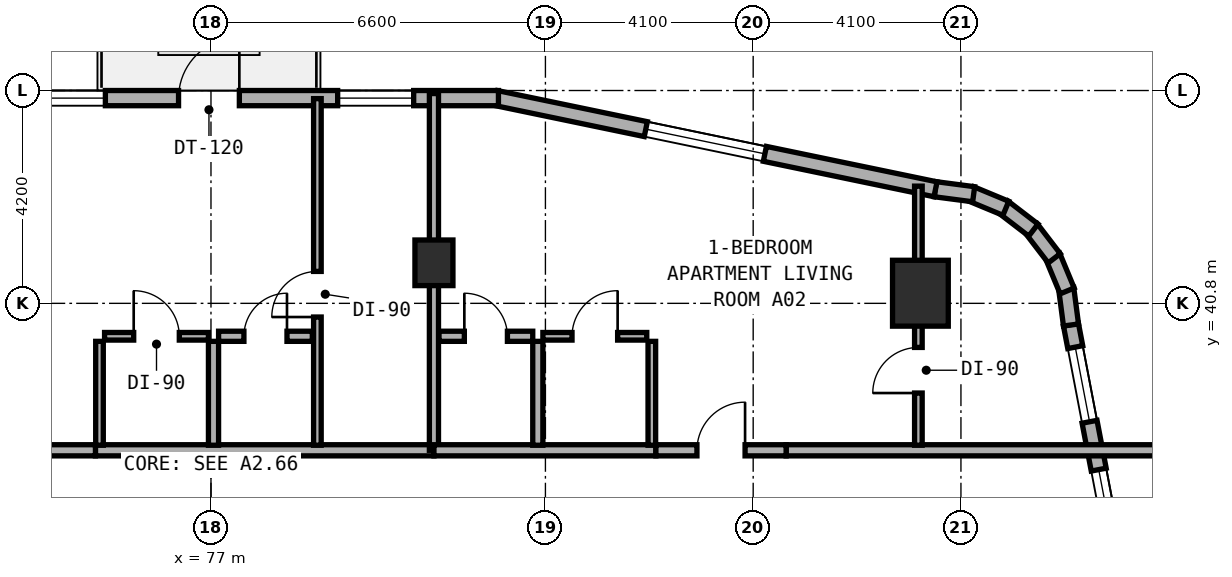
"""IFC4 building model, lengths in metres.
Left out: names, types, materials, properties, quantities, classifications, styles, units other than length and angle.
Written with IfcOpenShell. Run it as: python <this file> out.ifc"""

import sys

from ifc_helpers import new_model, si_unit, direction, frame, frame_2d, origin, origin_2d, place, context, subcontext, project, spatial, rectangle, extrude, element, fill, save


model = new_model("IFC4")
c1 = context("Model", 3, precision=1e-05, world=origin(), true_north=direction((0.0, 1.0)))
c2 = subcontext(c1, "Body", "Model", "MODEL_VIEW")
j1 = project(units=[si_unit("LENGTHUNIT", "METRE"), si_unit("PLANEANGLEUNIT", "RADIAN")], contexts=[c1])
p1 = place(None, origin())
s1 = spatial("IfcSite", under=j1, at=p1, CompositionType="ELEMENT")
p2 = place(p1, origin())
s2 = spatial("IfcBuilding", under=s1, at=p2, CompositionType="ELEMENT")
p3 = place(p2, frame((0.0, 0.0, 27.5)))
s3 = spatial("IfcBuildingStorey", under=s2, at=p3, CompositionType="ELEMENT", Elevation=27.5)
p4 = place(p3, frame((81.4, 41.6, 0.0), z_axis=(0.0, 0.0, 1.0), x_axis=(1.0, 0.0, 0.0)))
e1 = element("IfcColumn", 1, at=p4, inside=s3, PredefinedType="COLUMN", context=c2, shape_type="SweptSolid", body=[
    extrude(rectangle(XDim=0.75, YDim=0.9, at=origin_2d()), origin(), (0.0, 0.0, 1.0), 3.5),
])
p5 = place(p3, frame((91.0, 41.0, 0.0), z_axis=(0.0, 0.0, 1.0), x_axis=(1.0, 0.0, 0.0)))
e2 = element("IfcColumn", 2, at=p5, inside=s3, PredefinedType="COLUMN", context=c2, shape_type="SweptSolid", body=[
    extrude(rectangle(XDim=1.1, YDim=1.3, at=origin_2d()), origin(), (0.0, 0.0, 1.0), 3.5),
])
p6 = place(p3, frame((95.783, 30.918, 0.0), z_axis=(0.0, 0.0, 1.0), x_axis=(-0.188087874316, 0.982152203854, 0.0)))
e3 = element("IfcWall", 3, at=p6, inside=s3, PredefinedType="STANDARD", context=c2, shape_type="SweptSolid", body=[
    extrude(rectangle(XDim=9.634, YDim=0.3, at=frame_2d((4.817, 0.0))), origin(), (0.0, 0.0, 1.0), 3.25),
])
p7 = place(p6, frame((1.999, 0.0, 0.8)))
e4 = element("IfcOpeningElement", 4, at=p7, cuts=e3, PredefinedType="OPENING", context=c2, shape_type="SweptSolid", body=[
    extrude(rectangle(XDim=2.4, YDim=1.6, at=frame_2d((1.2, 0.8))), frame((0.0, 0.16, 0.0), z_axis=(0.0, -1.0, 0.0), x_axis=(1.0, 0.0, 0.0)), (0.0, 0.0, 1.0), 0.32),
])
p8 = place(p6, frame((5.521, 0.0, 0.85)))
e5 = element("IfcOpeningElement", 5, at=p8, cuts=e3, PredefinedType="OPENING", context=c2, shape_type="SweptSolid", body=[
    extrude(rectangle(XDim=1.2, YDim=1.5, at=frame_2d((0.6, 0.75))), frame((0.0, 0.16, 0.0), z_axis=(0.0, -1.0, 0.0), x_axis=(1.0, 0.0, 0.0)), (0.0, 0.0, 1.0), 0.32),
])
p9 = place(p6, frame((7.682, 0.0, 0.85)))
e6 = element("IfcOpeningElement", 6, at=p9, cuts=e3, PredefinedType="OPENING", context=c2, shape_type="SweptSolid", body=[
    extrude(rectangle(XDim=1.5, YDim=1.5, at=frame_2d((0.75, 0.75))), frame((0.0, 0.16, 0.0), z_axis=(0.0, -1.0, 0.0), x_axis=(1.0, 0.0, 0.0)), (0.0, 0.0, 1.0), 0.32),
])
p10 = place(p3, frame((93.972, 40.373, 0.0), z_axis=(0.0, 0.0, 1.0), x_axis=(-0.130255288807, 0.991480488834, 0.0)))
e7 = element("IfcWall", 7, at=p10, inside=s3, PredefinedType="STANDARD", context=c2, shape_type="SweptSolid", body=[
    extrude(rectangle(XDim=0.729, YDim=0.3, at=frame_2d((0.365, 0.0))), origin(), (0.0, 0.0, 1.0), 3.25),
])
p11 = place(p3, frame((93.896, 41.045, 0.0), z_axis=(0.0, 0.0, 1.0), x_axis=(-0.383267045233, 0.923637576129, 0.0)))
e8 = element("IfcWall", 8, at=p11, inside=s3, PredefinedType="STANDARD", context=c2, shape_type="SweptSolid", body=[
    extrude(rectangle(XDim=0.746, YDim=0.3, at=frame_2d((0.373, 0.0))), origin(), (0.0, 0.0, 1.0), 3.25),
])
for number, where, z_axis, x_axis in (
    (9, (93.641, 41.689, 0.0), (0.0, 0.0, 1.0), (-0.609, 0.793, 0.0)),
    (10, (93.229, 42.246, 0.0), (0.0, 0.0, 1.0), (-0.794, 0.608, 0.0)),
):
    element("IfcWall", number, at=place(p3, frame(where, z_axis=z_axis, x_axis=x_axis)), inside=s3, PredefinedType="STANDARD", context=c2, shape_type="SweptSolid", body=[
        extrude(rectangle(XDim=0.746, YDim=0.3, at=frame_2d((0.373, 0.0))), origin(), (0.0, 0.0, 1.0), 3.25),
    ])
p12 = place(p3, frame((92.686, 42.676, 0.0), z_axis=(0.0, 0.0, 1.0), x_axis=(-0.923637576129, 0.383267045233, 0.0)))
e11 = element("IfcWall", 11, at=p12, inside=s3, PredefinedType="STANDARD", context=c2, shape_type="SweptSolid", body=[
    extrude(rectangle(XDim=0.746, YDim=0.3, at=frame_2d((0.373, 0.0))), origin(), (0.0, 0.0, 1.0), 3.25),
])
p13 = place(p3, frame((92.051, 42.953, 0.0), z_axis=(0.0, 0.0, 1.0), x_axis=(-0.991559404866, 0.129653178221, 0.0)))
e12 = element("IfcWall", 12, at=p13, inside=s3, PredefinedType="STANDARD", context=c2, shape_type="SweptSolid", body=[
    extrude(rectangle(XDim=0.764, YDim=0.3, at=frame_2d((0.382, 0.0))), origin(), (0.0, 0.0, 1.0), 3.25),
])
p14 = place(p3, frame((91.298, 43.051, 0.0), z_axis=(0.0, 0.0, 1.0), x_axis=(-0.979120793441, 0.203279295189, 0.0)))
e13 = element("IfcWall", 13, at=p14, inside=s3, PredefinedType="STANDARD", context=c2, shape_type="SweptSolid", body=[
    extrude(rectangle(XDim=8.855, YDim=0.3, at=frame_2d((4.427, 0.0))), origin(), (0.0, 0.0, 1.0), 3.25),
])
p15 = place(p14, frame((3.439, 0.0, 0.8)))
e14 = element("IfcOpeningElement", 14, at=p15, cuts=e13, PredefinedType="OPENING", context=c2, shape_type="SweptSolid", body=[
    extrude(rectangle(XDim=2.4, YDim=1.6, at=frame_2d((1.2, 0.8))), frame((0.0, 0.16, 0.0), z_axis=(0.0, -1.0, 0.0), x_axis=(1.0, 0.0, 0.0)), (0.0, 0.0, 1.0), 0.32),
])
p16 = place(p3, frame((82.673, 44.85, 0.0), z_axis=(0.0, 0.0, 1.0), x_axis=(-1.0, 0.0, 0.0)))
e15 = element("IfcWall", 15, at=p16, inside=s3, PredefinedType="STANDARD", context=c2, shape_type="SweptSolid", body=[
    extrude(rectangle(XDim=11.391, YDim=0.3, at=frame_2d((5.696, 0.0))), origin(), (0.0, 0.0, 1.0), 3.25),
])
p17 = place(p16, frame((5.113, 0.0, 0.0)))
e16 = element("IfcOpeningElement", 16, at=p17, cuts=e15, PredefinedType="OPENING", context=c2, shape_type="SweptSolid", body=[
    extrude(rectangle(XDim=1.2, YDim=2.15, at=frame_2d((0.6, 1.075))), frame((0.0, 0.16, 0.0), z_axis=(0.0, -1.0, 0.0), x_axis=(1.0, 0.0, 0.0)), (0.0, 0.0, 1.0), 0.32),
])
p18 = place(p16, frame((1.673, 0.0, 0.85)))
e17 = element("IfcOpeningElement", 17, at=p18, cuts=e15, PredefinedType="OPENING", context=c2, shape_type="SweptSolid", body=[
    extrude(rectangle(XDim=1.5, YDim=1.5, at=frame_2d((0.75, 0.75))), frame((0.0, 0.16, 0.0), z_axis=(0.0, -1.0, 0.0), x_axis=(1.0, 0.0, 0.0)), (0.0, 0.0, 1.0), 0.32),
])
p19 = place(p16, frame((7.757, 0.0, 0.8)))
e18 = element("IfcOpeningElement", 18, at=p19, cuts=e15, PredefinedType="OPENING", context=c2, shape_type="SweptSolid", body=[
    extrude(rectangle(XDim=2.4, YDim=1.6, at=frame_2d((1.2, 0.8))), frame((0.0, 0.16, 0.0), z_axis=(0.0, -1.0, 0.0), x_axis=(1.0, 0.0, 0.0)), (0.0, 0.0, 1.0), 0.32),
])
p20 = place(p3, frame((74.72, 37.9, 0.0), z_axis=(0.0, 0.0, 1.0), x_axis=(1.0, 0.0, 0.0)))
e19 = element("IfcWall", 19, at=p20, inside=s3, PredefinedType="SOLIDWALL", context=c2, shape_type="SweptSolid", body=[
    extrude(rectangle(XDim=6.68, YDim=0.22, at=frame_2d((3.34, 0.0))), origin(), (0.0, 0.0, 1.0), 2.725),
])
p21 = place(p3, frame((65.85, 37.9, 0.0), z_axis=(0.0, 0.0, 1.0), x_axis=(1.0, 0.0, 0.0)))
e20 = element("IfcWall", 20, at=p21, inside=s3, PredefinedType="SOLIDWALL", context=c2, shape_type="SweptSolid", body=[
    extrude(rectangle(XDim=8.87, YDim=0.22, at=frame_2d((4.435, 0.0))), origin(), (0.0, 0.0, 1.0), 2.725),
])
p22 = place(p21, frame((3.96, 0.0, 0.0)))
e21 = element("IfcOpeningElement", 21, at=p22, cuts=e20, PredefinedType="OPENING", context=c2, shape_type="SweptSolid", body=[
    extrude(rectangle(XDim=0.95, YDim=2.1, at=frame_2d((0.475, 1.05))), frame((0.0, 0.12, 0.0), z_axis=(0.0, -1.0, 0.0), x_axis=(1.0, 0.0, 0.0)), (0.0, 0.0, 1.0), 0.24),
])
p23 = place(p3, frame((79.1, 38.0, 0.0), z_axis=(0.0, 0.0, 1.0), x_axis=(0.0, 1.0, 0.0)))
e22 = element("IfcWall", 22, at=p23, inside=s3, PredefinedType="PARTITIONING", context=c2, shape_type="SweptSolid", body=[
    extrude(rectangle(XDim=6.84, YDim=0.15, at=frame_2d((3.42, 0.0))), origin(), (0.0, 0.0, 1.0), 2.775),
])
p24 = place(p23, frame((2.53, 0.0, 0.0)))
e23 = element("IfcOpeningElement", 23, at=p24, cuts=e22, PredefinedType="OPENING", context=c2, shape_type="SweptSolid", body=[
    extrude(rectangle(XDim=0.9, YDim=2.1, at=frame_2d((0.45, 1.05))), frame((0.0, 0.085, 0.0), z_axis=(0.0, -1.0, 0.0), x_axis=(1.0, 0.0, 0.0)), (0.0, 0.0, 1.0), 0.17),
])
p25 = place(p3, frame((77.05, 38.0, 0.0), z_axis=(0.0, 0.0, 1.0), x_axis=(0.0, 1.0, 0.0)))
e24 = element("IfcWall", 24, at=p25, inside=s3, PredefinedType="PLUMBINGWALL", context=c2, shape_type="SweptSolid", body=[
    extrude(rectangle(XDim=2.05, YDim=0.2, at=frame_2d((1.025, 0.0))), origin(), (0.0, 0.0, 1.0), 2.775),
])
p26 = place(p3, frame((74.8, 38.0, 0.0), z_axis=(0.0, 0.0, 1.0), x_axis=(0.0, 1.0, 0.0)))
e25 = element("IfcWall", 25, at=p26, inside=s3, PredefinedType="PARTITIONING", context=c2, shape_type="SweptSolid", body=[
    extrude(rectangle(XDim=2.05, YDim=0.15, at=frame_2d((1.025, 0.0))), origin(), (0.0, 0.0, 1.0), 2.775),
])
p27 = place(p3, frame((77.15, 40.15, 0.0), z_axis=(0.0, 0.0, 1.0), x_axis=(1.0, 0.0, 0.0)))
e26 = element("IfcWall", 26, at=p27, inside=s3, PredefinedType="PLUMBINGWALL", context=c2, shape_type="SweptSolid", body=[
    extrude(rectangle(XDim=1.85, YDim=0.2, at=frame_2d((0.925, 0.0))), origin(), (0.0, 0.0, 1.0), 3.22),
])
p28 = place(p27, frame((0.5, 0.0, 0.0)))
e27 = element("IfcOpeningElement", 27, at=p28, cuts=e26, PredefinedType="OPENING", context=c2, shape_type="SweptSolid", body=[
    extrude(rectangle(XDim=0.85, YDim=2.1, at=frame_2d((0.425, 1.05))), frame((0.0, 0.11, 0.0), z_axis=(0.0, -1.0, 0.0), x_axis=(1.0, 0.0, 0.0)), (0.0, 0.0, 1.0), 0.22),
])
p29 = place(p3, frame((74.9, 40.15, 0.0), z_axis=(0.0, 0.0, 1.0), x_axis=(1.0, 0.0, 0.0)))
e28 = element("IfcWall", 28, at=p29, inside=s3, PredefinedType="PARTITIONING", context=c2, shape_type="SweptSolid", body=[
    extrude(rectangle(XDim=2.05, YDim=0.15, at=frame_2d((1.025, 0.0))), origin(), (0.0, 0.0, 1.0), 3.22),
])
p30 = place(p29, frame((0.575, 0.0, 0.0)))
e29 = element("IfcOpeningElement", 29, at=p30, cuts=e28, PredefinedType="OPENING", context=c2, shape_type="SweptSolid", body=[
    extrude(rectangle(XDim=0.9, YDim=2.1, at=frame_2d((0.45, 1.05))), frame((0.0, 0.085, 0.0), z_axis=(0.0, -1.0, 0.0), x_axis=(1.0, 0.0, 0.0)), (0.0, 0.0, 1.0), 0.17),
])
p31 = place(p3, frame((81.4, 37.9, 0.0), z_axis=(0.0, 0.0, 1.0), x_axis=(0.0, 1.0, 0.0)))
e30 = element("IfcWall", 30, at=p31, inside=s3, PredefinedType="SOLIDWALL", context=c2, shape_type="SweptSolid", body=[
    extrude(rectangle(XDim=7.04, YDim=0.18, at=frame_2d((3.52, 0.0))), origin(), (0.0, 0.0, 1.0), 2.725),
])
p32 = place(p3, frame((81.4, 37.9, 0.0), z_axis=(0.0, 0.0, 1.0), x_axis=(1.0, 0.0, 0.0)))
e31 = element("IfcWall", 31, at=p32, inside=s3, PredefinedType="SOLIDWALL", context=c2, shape_type="SweptSolid", body=[
    extrude(rectangle(XDim=4.38, YDim=0.22, at=frame_2d((2.19, 0.0))), origin(), (0.0, 0.0, 1.0), 2.725),
])
p33 = place(p3, frame((88.35, 37.9, 0.0), z_axis=(0.0, 0.0, 1.0), x_axis=(1.0, 0.0, 0.0)))
e32 = element("IfcWall", 32, at=p33, inside=s3, PredefinedType="SOLIDWALL", context=c2, shape_type="SweptSolid", body=[
    extrude(rectangle(XDim=7.41, YDim=0.22, at=frame_2d((3.705, 0.0))), origin(), (0.0, 0.0, 1.0), 2.865),
])
p34 = place(p3, frame((85.78, 37.9, 0.0), z_axis=(0.0, 0.0, 1.0), x_axis=(1.0, 0.0, 0.0)))
e33 = element("IfcWall", 33, at=p34, inside=s3, PredefinedType="SOLIDWALL", context=c2, shape_type="SweptSolid", body=[
    extrude(rectangle(XDim=2.57, YDim=0.22, at=frame_2d((1.285, 0.0))), origin(), (0.0, 0.0, 1.0), 3.22),
])
p35 = place(p34, frame((0.81, 0.0, 0.0)))
e34 = element("IfcOpeningElement", 34, at=p35, cuts=e33, PredefinedType="OPENING", context=c2, shape_type="SweptSolid", body=[
    extrude(rectangle(XDim=0.95, YDim=2.1, at=frame_2d((0.475, 1.05))), frame((0.0, 0.12, 0.0), z_axis=(0.0, -1.0, 0.0), x_axis=(1.0, 0.0, 0.0)), (0.0, 0.0, 1.0), 0.24),
])
p36 = place(p3, frame((90.96, 38.0, 0.0), z_axis=(0.0, 0.0, 1.0), x_axis=(0.0, 1.0, 0.0)))
e35 = element("IfcWall", 35, at=p36, inside=s3, PredefinedType="PARTITIONING", context=c2, shape_type="SweptSolid", body=[
    extrude(rectangle(XDim=5.113, YDim=0.15, at=frame_2d((2.557, 0.0))), origin(), (0.0, 0.0, 1.0), 2.865),
])
p37 = place(p36, frame((1.03, 0.0, 0.0)))
e36 = element("IfcOpeningElement", 36, at=p37, cuts=e35, PredefinedType="OPENING", context=c2, shape_type="SweptSolid", body=[
    extrude(rectangle(XDim=0.9, YDim=2.1, at=frame_2d((0.45, 1.05))), frame((0.0, 0.085, 0.0), z_axis=(0.0, -1.0, 0.0), x_axis=(1.0, 0.0, 0.0)), (0.0, 0.0, 1.0), 0.17),
])
p38 = place(p3, frame((83.45, 38.0, 0.0), z_axis=(0.0, 0.0, 1.0), x_axis=(0.0, 1.0, 0.0)))
e37 = element("IfcWall", 37, at=p38, inside=s3, PredefinedType="PLUMBINGWALL", context=c2, shape_type="SweptSolid", body=[
    extrude(rectangle(XDim=2.05, YDim=0.2, at=frame_2d((1.025, 0.0))), origin(), (0.0, 0.0, 1.0), 3.22),
])
p39 = place(p3, frame((85.7, 38.0, 0.0), z_axis=(0.0, 0.0, 1.0), x_axis=(0.0, 1.0, 0.0)))
e38 = element("IfcWall", 38, at=p39, inside=s3, PredefinedType="PARTITIONING", context=c2, shape_type="SweptSolid", body=[
    extrude(rectangle(XDim=2.05, YDim=0.15, at=frame_2d((1.025, 0.0))), origin(), (0.0, 0.0, 1.0), 3.22),
])
p40 = place(p3, frame((81.5, 40.15, 0.0), z_axis=(0.0, 0.0, 1.0), x_axis=(1.0, 0.0, 0.0)))
e39 = element("IfcWall", 39, at=p40, inside=s3, PredefinedType="PLUMBINGWALL", context=c2, shape_type="SweptSolid", body=[
    extrude(rectangle(XDim=1.85, YDim=0.2, at=frame_2d((0.925, 0.0))), origin(), (0.0, 0.0, 1.0), 2.725),
])
p41 = place(p40, frame((0.5, 0.0, 0.0)))
e40 = element("IfcOpeningElement", 40, at=p41, cuts=e39, PredefinedType="OPENING", context=c2, shape_type="SweptSolid", body=[
    extrude(rectangle(XDim=0.85, YDim=2.1, at=frame_2d((0.425, 1.05))), frame((0.0, 0.11, 0.0), z_axis=(0.0, -1.0, 0.0), x_axis=(1.0, 0.0, 0.0)), (0.0, 0.0, 1.0), 0.22),
])
p42 = place(p3, frame((83.55, 40.15, 0.0), z_axis=(0.0, 0.0, 1.0), x_axis=(1.0, 0.0, 0.0)))
e41 = element("IfcWall", 41, at=p42, inside=s3, PredefinedType="PARTITIONING", context=c2, shape_type="SweptSolid", body=[
    extrude(rectangle(XDim=2.05, YDim=0.15, at=frame_2d((1.025, 0.0))), origin(), (0.0, 0.0, 1.0), 3.22),
])
p43 = place(p42, frame((0.575, 0.0, 0.0)))
e42 = element("IfcOpeningElement", 42, at=p43, cuts=e41, PredefinedType="OPENING", context=c2, shape_type="SweptSolid", body=[
    extrude(rectangle(XDim=0.9, YDim=2.1, at=frame_2d((0.45, 1.05))), frame((0.0, 0.085, 0.0), z_axis=(0.0, -1.0, 0.0), x_axis=(1.0, 0.0, 0.0)), (0.0, 0.0, 1.0), 0.17),
])
p44 = place(p8, origin())
e43 = element("IfcWindow", 43, at=p44, inside=s3, PartitioningType="SINGLE_PANEL", PredefinedType="WINDOW", context=c2, shape_type="SweptSolid", body=[
    extrude(rectangle(XDim=1.2, YDim=1.5, at=frame_2d((0.6, 0.75))), frame((0.0, 0.03, 0.0), z_axis=(0.0, -1.0, 0.0), x_axis=(1.0, 0.0, 0.0)), (0.0, 0.0, 1.0), 0.06),
])
fill(e5, e43)
p45 = place(p9, origin())
e44 = element("IfcWindow", 44, at=p45, inside=s3, PartitioningType="SINGLE_PANEL", PredefinedType="WINDOW", context=c2, shape_type="SweptSolid", body=[
    extrude(rectangle(XDim=1.5, YDim=1.5, at=frame_2d((0.75, 0.75))), frame((0.0, 0.03, 0.0), z_axis=(0.0, -1.0, 0.0), x_axis=(1.0, 0.0, 0.0)), (0.0, 0.0, 1.0), 0.06),
])
fill(e6, e44)
p46 = place(p15, origin())
e45 = element("IfcWindow", 45, at=p46, inside=s3, PartitioningType="SINGLE_PANEL", PredefinedType="WINDOW", context=c2, shape_type="SweptSolid", body=[
    extrude(rectangle(XDim=2.4, YDim=1.6, at=frame_2d((1.2, 0.8))), frame((0.0, 0.03, 0.0), z_axis=(0.0, -1.0, 0.0), x_axis=(1.0, 0.0, 0.0)), (0.0, 0.0, 1.0), 0.06),
])
fill(e14, e45)
p47 = place(p17, frame((1.2, 0.0, 0.0), z_axis=(0.0, 0.0, 1.0), x_axis=(-1.0, 0.0, 0.0)))
e46 = element("IfcDoor", 46, at=p47, inside=s3, OperationType="SINGLE_SWING_RIGHT", PredefinedType="DOOR", context=c2, shape_type="SweptSolid", body=[
    extrude(rectangle(XDim=1.2, YDim=2.15, at=frame_2d((0.6, 1.075))), frame((0.0, 0.025, 0.0), z_axis=(0.0, -1.0, 0.0), x_axis=(1.0, 0.0, 0.0)), (0.0, 0.0, 1.0), 0.05),
])
fill(e16, e46)
p48 = place(p18, origin())
e47 = element("IfcWindow", 47, at=p48, inside=s3, PartitioningType="SINGLE_PANEL", PredefinedType="WINDOW", context=c2, shape_type="SweptSolid", body=[
    extrude(rectangle(XDim=1.5, YDim=1.5, at=frame_2d((0.75, 0.75))), frame((0.0, 0.03, 0.0), z_axis=(0.0, -1.0, 0.0), x_axis=(1.0, 0.0, 0.0)), (0.0, 0.0, 1.0), 0.06),
])
fill(e17, e47)
p49 = place(p19, origin())
e48 = element("IfcWindow", 48, at=p49, inside=s3, PartitioningType="SINGLE_PANEL", PredefinedType="WINDOW", context=c2, shape_type="SweptSolid", body=[
    extrude(rectangle(XDim=2.4, YDim=1.6, at=frame_2d((1.2, 0.8))), frame((0.0, 0.03, 0.0), z_axis=(0.0, -1.0, 0.0), x_axis=(1.0, 0.0, 0.0)), (0.0, 0.0, 1.0), 0.06),
])
fill(e18, e48)
p50 = place(p24, origin())
e49 = element("IfcDoor", 49, at=p50, inside=s3, OperationType="SINGLE_SWING_LEFT", PredefinedType="DOOR", context=c2, shape_type="SweptSolid", body=[
    extrude(rectangle(XDim=0.9, YDim=2.1, at=frame_2d((0.45, 1.05))), frame((0.0, 0.025, 0.0), z_axis=(0.0, -1.0, 0.0), x_axis=(1.0, 0.0, 0.0)), (0.0, 0.0, 1.0), 0.05),
])
fill(e23, e49)
p51 = place(p28, origin())
e50 = element("IfcDoor", 50, at=p51, inside=s3, OperationType="SINGLE_SWING_RIGHT", PredefinedType="DOOR", context=c2, shape_type="SweptSolid", body=[
    extrude(rectangle(XDim=0.85, YDim=2.1, at=frame_2d((0.425, 1.05))), frame((0.0, 0.025, 0.0), z_axis=(0.0, -1.0, 0.0), x_axis=(1.0, 0.0, 0.0)), (0.0, 0.0, 1.0), 0.05),
])
fill(e27, e50)
p52 = place(p30, origin())
e51 = element("IfcDoor", 51, at=p52, inside=s3, OperationType="SINGLE_SWING_LEFT", PredefinedType="DOOR", context=c2, shape_type="SweptSolid", body=[
    extrude(rectangle(XDim=0.9, YDim=2.1, at=frame_2d((0.45, 1.05))), frame((0.0, 0.025, 0.0), z_axis=(0.0, -1.0, 0.0), x_axis=(1.0, 0.0, 0.0)), (0.0, 0.0, 1.0), 0.05),
])
fill(e29, e51)
p53 = place(p35, origin())
e52 = element("IfcDoor", 52, at=p53, inside=s3, OperationType="SINGLE_SWING_RIGHT", PredefinedType="DOOR", context=c2, shape_type="SweptSolid", body=[
    extrude(rectangle(XDim=0.95, YDim=2.1, at=frame_2d((0.475, 1.05))), frame((0.0, 0.025, 0.0), z_axis=(0.0, -1.0, 0.0), x_axis=(1.0, 0.0, 0.0)), (0.0, 0.0, 1.0), 0.05),
])
fill(e34, e52)
p54 = place(p37, origin())
e53 = element("IfcDoor", 53, at=p54, inside=s3, OperationType="SINGLE_SWING_LEFT", PredefinedType="DOOR", context=c2, shape_type="SweptSolid", body=[
    extrude(rectangle(XDim=0.9, YDim=2.1, at=frame_2d((0.45, 1.05))), frame((0.0, 0.025, 0.0), z_axis=(0.0, -1.0, 0.0), x_axis=(1.0, 0.0, 0.0)), (0.0, 0.0, 1.0), 0.05),
])
fill(e36, e53)
p55 = place(p41, origin())
e54 = element("IfcDoor", 54, at=p55, inside=s3, OperationType="SINGLE_SWING_LEFT", PredefinedType="DOOR", context=c2, shape_type="SweptSolid", body=[
    extrude(rectangle(XDim=0.85, YDim=2.1, at=frame_2d((0.425, 1.05))), frame((0.0, 0.025, 0.0), z_axis=(0.0, -1.0, 0.0), x_axis=(1.0, 0.0, 0.0)), (0.0, 0.0, 1.0), 0.05),
])
fill(e40, e54)
p56 = place(p43, origin())
e55 = element("IfcDoor", 55, at=p56, inside=s3, OperationType="SINGLE_SWING_RIGHT", PredefinedType="DOOR", context=c2, shape_type="SweptSolid", body=[
    extrude(rectangle(XDim=0.9, YDim=2.1, at=frame_2d((0.45, 1.05))), frame((0.0, 0.025, 0.0), z_axis=(0.0, -1.0, 0.0), x_axis=(1.0, 0.0, 0.0)), (0.0, 0.0, 1.0), 0.05),
])
fill(e42, e55)
save(model, sys.argv[1])
